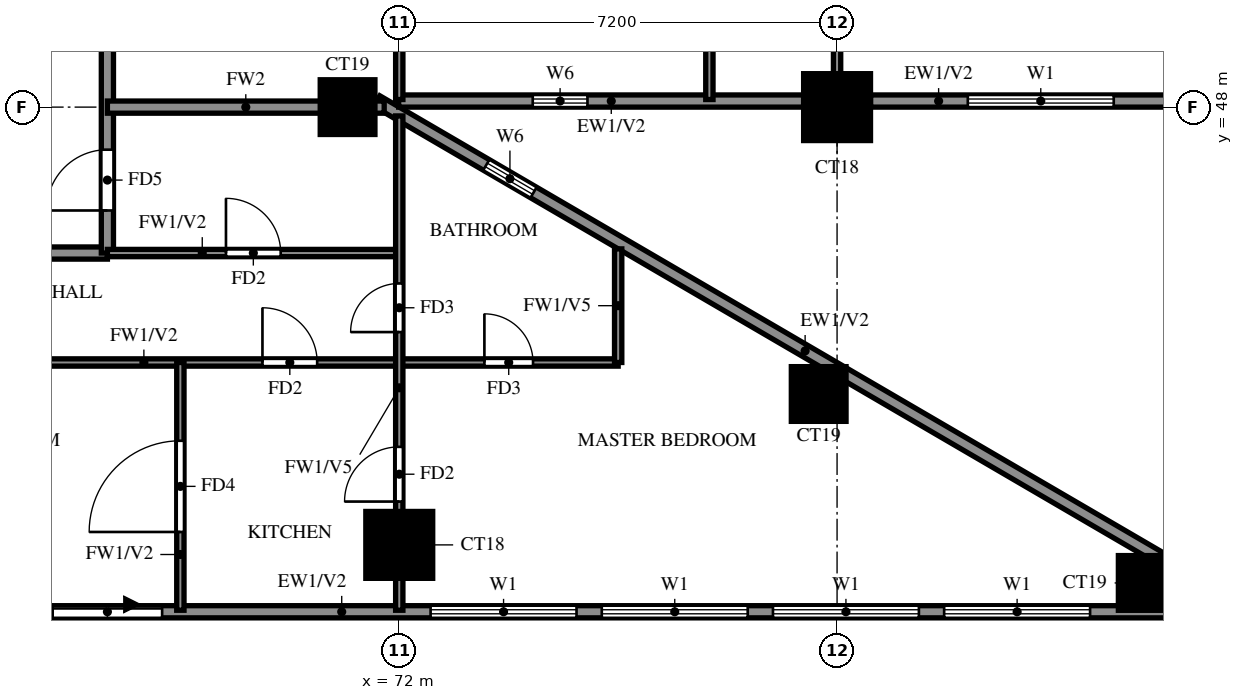
"""IFC4 building model, lengths in metres.
Left out: names, types, materials, properties, quantities, classifications, styles, units other than length and angle.
Written with IfcOpenShell. Run it as: python <this file> out.ifc"""

import sys

from ifc_helpers import new_model, si_unit, direction, frame, frame_2d, origin, origin_2d, place, context, subcontext, project, spatial, rectangle, extrude, source, transform, mapped, element, fill, save


model = new_model("IFC4")
c1 = context("Model", 3, precision=1e-05, world=origin(), true_north=direction((0.0, 1.0)))
c2 = subcontext(c1, "Body", "Model", "MODEL_VIEW")
j1 = project(units=[si_unit("LENGTHUNIT", "METRE"), si_unit("PLANEANGLEUNIT", "RADIAN")], contexts=[c1])
p1 = place(None, origin())
s1 = spatial("IfcSite", under=j1, at=p1, CompositionType="ELEMENT")
p2 = place(p1, origin())
s2 = spatial("IfcBuilding", under=s1, at=p2, CompositionType="ELEMENT")
p3 = place(p2, frame((0.0, 0.0, 116.5)))
s3 = spatial("IfcBuildingStorey", under=s2, at=p3, CompositionType="ELEMENT", Elevation=116.5)
m1 = source(origin(), c2, "Body", "SweptSolid", [
    extrude(rectangle(XDim=0.9, YDim=0.9, at=origin_2d()), origin(), (0.0, 0.0, 1.0), 3.2),
])
p4 = place(p3, frame((84.276, 40.174, 0.0), z_axis=(0.0, 0.0, 1.0), x_axis=(1.0, 0.0, 0.0)))
e1 = element("IfcColumn", 1, at=p4, inside=s3, PredefinedType="COLUMN", context=c2, shape_type="MappedRepresentation", body=[
    mapped(m1, transform((0.0, 0.0, 0.0))),
])
m2 = source(origin(), c2, "Body", "SweptSolid", [
    extrude(rectangle(XDim=1.1, YDim=1.1, at=origin_2d()), origin(), (0.0, 0.0, 1.0), 3.2),
])
p5 = place(p3, frame((72.0, 40.8, 0.0), z_axis=(0.0, 0.0, 1.0), x_axis=(1.0, 0.0, 0.0)))
e2 = element("IfcColumn", 2, at=p5, inside=s3, PredefinedType="COLUMN", context=c2, shape_type="MappedRepresentation", body=[
    mapped(m2, transform((0.0, 0.0, 0.0))),
])
for number, where, z_axis, x_axis in (
    (3, (78.898, 43.282, 0.0), (0.0, 0.0, 1.0), (1.0, 0.0, 0.0)),
    (4, (71.15, 48.0, 0.0), (0.0, 0.0, 1.0), (1.0, 0.0, 0.0)),
):
    element("IfcColumn", number, at=place(p3, frame(where, z_axis=z_axis, x_axis=x_axis)), inside=s3, PredefinedType="COLUMN", context=c2, shape_type="MappedRepresentation", body=[
        mapped(m1, transform((0.0, 0.0, 0.0))),
    ])
p6 = place(p3, frame((79.2, 48.0, 0.0), z_axis=(0.0, 0.0, 1.0), x_axis=(1.0, 0.0, 0.0)))
e5 = element("IfcColumn", 5, at=p6, inside=s3, PredefinedType="COLUMN", context=c2, shape_type="MappedRepresentation", body=[
    mapped(m2, transform((0.0, 0.0, 0.0))),
])
p7 = place(p3, frame((85.719, 39.881, 0.0), z_axis=(0.0, 0.0, 1.0), x_axis=(-0.86377618652, 0.503875678716, 0.0)))
e6 = element("IfcWall", 6, at=p7, inside=s3, PredefinedType="SOLIDWALL", context=c2, shape_type="SweptSolid", body=[
    extrude(rectangle(XDim=16.311, YDim=0.2, at=frame_2d((8.156, 0.0))), origin(), (0.0, 0.0, 1.0), 3.2),
])
p8 = place(p7, frame((13.326, 0.0, 1.5)))
e7 = element("IfcOpeningElement", 7, at=p8, cuts=e6, PredefinedType="OPENING", context=c2, shape_type="SweptSolid", body=[
    extrude(rectangle(XDim=0.9, YDim=0.9, at=frame_2d((0.45, 0.45))), frame((0.0, 0.11, 0.0), z_axis=(0.0, -1.0, 0.0), x_axis=(1.0, 0.0, 0.0)), (0.0, 0.0, 1.0), 0.22),
])
p9 = place(p3, frame((71.99, 48.1, 0.0), z_axis=(0.0, 0.0, 1.0), x_axis=(1.0, 0.0, 0.0)))
e8 = element("IfcWall", 8, at=p9, inside=s3, PredefinedType="SOLIDWALL", context=c2, shape_type="SweptSolid", body=[
    extrude(rectangle(XDim=6.66, YDim=0.2, at=frame_2d((3.33, 0.0))), origin(), (0.0, 0.0, 1.0), 3.2),
])
p10 = place(p9, frame((2.205, 0.0, 1.5)))
e9 = element("IfcOpeningElement", 9, at=p10, cuts=e8, PredefinedType="OPENING", context=c2, shape_type="SweptSolid", body=[
    extrude(rectangle(XDim=0.9, YDim=0.9, at=frame_2d((0.45, 0.45))), frame((0.0, 0.11, 0.0), z_axis=(0.0, -1.0, 0.0), x_axis=(1.0, 0.0, 0.0)), (0.0, 0.0, 1.0), 0.22),
])
p11 = place(p3, frame((79.75, 48.1, 0.0), z_axis=(0.0, 0.0, 1.0), x_axis=(1.0, 0.0, 0.0)))
e10 = element("IfcWall", 10, at=p11, inside=s3, PredefinedType="SOLIDWALL", context=c2, shape_type="SweptSolid", body=[
    extrude(rectangle(XDim=5.6, YDim=0.2, at=frame_2d((2.8, 0.0))), origin(), (0.0, 0.0, 1.0), 3.2),
])
p12 = place(p11, frame((1.6, 0.0, 0.6)))
e11 = element("IfcOpeningElement", 11, at=p12, cuts=e10, PredefinedType="OPENING", context=c2, shape_type="SweptSolid", body=[
    extrude(rectangle(XDim=2.4, YDim=2.4, at=frame_2d((1.2, 1.2))), frame((0.0, 0.11, 0.0), z_axis=(0.0, -1.0, 0.0), x_axis=(1.0, 0.0, 0.0)), (0.0, 0.0, 1.0), 0.22),
])
p13 = place(p3, frame((58.8, 39.7, 0.0), z_axis=(0.0, 0.0, 1.0), x_axis=(1.0, 0.0, 0.0)))
e12 = element("IfcWall", 12, at=p13, inside=s3, PredefinedType="SOLIDWALL", context=c2, shape_type="SweptSolid", body=[
    extrude(rectangle(XDim=27.23, YDim=0.2, at=frame_2d((13.615, 0.0))), origin(), (0.0, 0.0, 1.0), 3.2),
])
p14 = place(p13, frame((7.5, 0.0, 0.0)))
e13 = element("IfcOpeningElement", 13, at=p14, cuts=e12, PredefinedType="OPENING", context=c2, shape_type="SweptSolid", body=[
    extrude(rectangle(XDim=1.8, YDim=2.4, at=frame_2d((0.9, 1.2))), frame((0.0, 0.11, 0.0), z_axis=(0.0, -1.0, 0.0), x_axis=(1.0, 0.0, 0.0)), (0.0, 0.0, 1.0), 0.22),
])
p15 = place(p13, frame((2.4, 0.0, 0.6)))
e14 = element("IfcOpeningElement", 14, at=p15, cuts=e12, PredefinedType="OPENING", context=c2, shape_type="SweptSolid", body=[
    extrude(rectangle(XDim=2.4, YDim=2.4, at=frame_2d((1.2, 1.2))), frame((0.0, 0.11, 0.0), z_axis=(0.0, -1.0, 0.0), x_axis=(1.0, 0.0, 0.0)), (0.0, 0.0, 1.0), 0.22),
])
p16 = place(p13, frame((13.715, 0.0, 0.6)))
e15 = element("IfcOpeningElement", 15, at=p16, cuts=e12, PredefinedType="OPENING", context=c2, shape_type="SweptSolid", body=[
    extrude(rectangle(XDim=2.4, YDim=2.4, at=frame_2d((1.2, 1.2))), frame((0.0, 0.11, 0.0), z_axis=(0.0, -1.0, 0.0), x_axis=(1.0, 0.0, 0.0)), (0.0, 0.0, 1.0), 0.22),
])
p17 = place(p13, frame((16.531, 0.0, 0.6)))
e16 = element("IfcOpeningElement", 16, at=p17, cuts=e12, PredefinedType="OPENING", context=c2, shape_type="SweptSolid", body=[
    extrude(rectangle(XDim=2.4, YDim=2.4, at=frame_2d((1.2, 1.2))), frame((0.0, 0.11, 0.0), z_axis=(0.0, -1.0, 0.0), x_axis=(1.0, 0.0, 0.0)), (0.0, 0.0, 1.0), 0.22),
])
p18 = place(p13, frame((19.346, 0.0, 0.6)))
e17 = element("IfcOpeningElement", 17, at=p18, cuts=e12, PredefinedType="OPENING", context=c2, shape_type="SweptSolid", body=[
    extrude(rectangle(XDim=2.4, YDim=2.4, at=frame_2d((1.2, 1.2))), frame((0.0, 0.11, 0.0), z_axis=(0.0, -1.0, 0.0), x_axis=(1.0, 0.0, 0.0)), (0.0, 0.0, 1.0), 0.22),
])
p19 = place(p13, frame((22.161, 0.0, 0.6)))
e18 = element("IfcOpeningElement", 18, at=p19, cuts=e12, PredefinedType="OPENING", context=c2, shape_type="SweptSolid", body=[
    extrude(rectangle(XDim=2.4, YDim=2.4, at=frame_2d((1.2, 1.2))), frame((0.0, 0.11, 0.0), z_axis=(0.0, -1.0, 0.0), x_axis=(1.0, 0.0, 0.0)), (0.0, 0.0, 1.0), 0.22),
])
p20 = place(p13, frame((26.003, 0.0, 0.6)))
e19 = element("IfcOpeningElement", 19, at=p20, cuts=e12, PredefinedType="OPENING", context=c2, shape_type="SweptSolid", body=[
    extrude(rectangle(XDim=0.9, YDim=2.4, at=frame_2d((0.45, 1.2))), frame((0.0, 0.11, 0.0), z_axis=(0.0, -1.0, 0.0), x_axis=(1.0, 0.0, 0.0)), (0.0, 0.0, 1.0), 0.22),
])
p21 = place(p3, frame((60.0, 45.6, 0.0), z_axis=(0.0, 0.0, 1.0), x_axis=(1.0, 0.0, 0.0)))
e20 = element("IfcWall", 20, at=p21, inside=s3, PredefinedType="SOLIDWALL", context=c2, shape_type="SweptSolid", body=[
    extrude(rectangle(XDim=7.2, YDim=0.2, at=frame_2d((3.6, 0.0))), origin(), (0.0, 0.0, 1.0), 3.2),
])
p22 = place(p3, frame((67.2, 45.6, 0.0), z_axis=(0.0, 0.0, 1.0), x_axis=(0.0, 1.0, 0.0)))
e21 = element("IfcWall", 21, at=p22, inside=s3, PredefinedType="SOLIDWALL", context=c2, shape_type="SweptSolid", body=[
    extrude(rectangle(XDim=8.4, YDim=0.2, at=frame_2d((4.2, 0.0))), origin(), (0.0, 0.0, 1.0), 3.2),
])
p23 = place(p22, frame((0.7, 0.0, 0.0)))
e22 = element("IfcOpeningElement", 22, at=p23, cuts=e21, PredefinedType="OPENING", context=c2, shape_type="SweptSolid", body=[
    extrude(rectangle(XDim=1.0, YDim=2.1, at=frame_2d((0.5, 1.05))), frame((0.0, 0.11, 0.0), z_axis=(0.0, -1.0, 0.0), x_axis=(1.0, 0.0, 0.0)), (0.0, 0.0, 1.0), 0.22),
])
p24 = place(p3, frame((67.2, 48.0, 0.0), z_axis=(0.0, 0.0, 1.0), x_axis=(1.0, 0.0, 0.0)))
e23 = element("IfcWall", 23, at=p24, inside=s3, PredefinedType="SOLIDWALL", context=c2, shape_type="SweptSolid", body=[
    extrude(rectangle(XDim=4.552, YDim=0.2, at=frame_2d((2.276, 0.0))), origin(), (0.0, 0.0, 1.0), 3.2),
])
p25 = place(p3, frame((60.0, 43.8, 0.0), z_axis=(0.0, 0.0, 1.0), x_axis=(1.0, 0.0, 0.0)))
e24 = element("IfcWall", 24, at=p25, inside=s3, PredefinedType="PARTITIONING", context=c2, shape_type="SweptSolid", body=[
    extrude(rectangle(XDim=15.6, YDim=0.12, at=frame_2d((7.8, 0.0))), origin(), (0.0, 0.0, 1.0), 3.2),
])
p26 = place(p25, frame((9.75, 0.0, 0.0)))
e25 = element("IfcOpeningElement", 25, at=p26, cuts=e24, PredefinedType="OPENING", context=c2, shape_type="SweptSolid", body=[
    extrude(rectangle(XDim=0.9, YDim=2.1, at=frame_2d((0.45, 1.05))), frame((0.0, 0.07, 0.0), z_axis=(0.0, -1.0, 0.0), x_axis=(1.0, 0.0, 0.0)), (0.0, 0.0, 1.0), 0.14),
])
p27 = place(p25, frame((3.45, 0.0, 0.0)))
e26 = element("IfcOpeningElement", 26, at=p27, cuts=e24, PredefinedType="OPENING", context=c2, shape_type="SweptSolid", body=[
    extrude(rectangle(XDim=1.5, YDim=2.1, at=frame_2d((0.75, 1.05))), frame((0.0, 0.07, 0.0), z_axis=(0.0, -1.0, 0.0), x_axis=(1.0, 0.0, 0.0)), (0.0, 0.0, 1.0), 0.14),
])
p28 = place(p25, frame((13.4, 0.0, 0.0)))
e27 = element("IfcOpeningElement", 27, at=p28, cuts=e24, PredefinedType="OPENING", context=c2, shape_type="SweptSolid", body=[
    extrude(rectangle(XDim=0.8, YDim=2.1, at=frame_2d((0.4, 1.05))), frame((0.0, 0.07, 0.0), z_axis=(0.0, -1.0, 0.0), x_axis=(1.0, 0.0, 0.0)), (0.0, 0.0, 1.0), 0.14),
])
p29 = place(p3, frame((67.2, 45.6, 0.0), z_axis=(0.0, 0.0, 1.0), x_axis=(1.0, 0.0, 0.0)))
e28 = element("IfcWall", 28, at=p29, inside=s3, PredefinedType="PARTITIONING", context=c2, shape_type="SweptSolid", body=[
    extrude(rectangle(XDim=4.8, YDim=0.12, at=frame_2d((2.4, 0.0))), origin(), (0.0, 0.0, 1.0), 3.2),
])
p30 = place(p29, frame((1.95, 0.0, 0.0)))
e29 = element("IfcOpeningElement", 29, at=p30, cuts=e28, PredefinedType="OPENING", context=c2, shape_type="SweptSolid", body=[
    extrude(rectangle(XDim=0.9, YDim=2.1, at=frame_2d((0.45, 1.05))), frame((0.0, 0.07, 0.0), z_axis=(0.0, -1.0, 0.0), x_axis=(1.0, 0.0, 0.0)), (0.0, 0.0, 1.0), 0.14),
])
p31 = place(p3, frame((68.4, 39.725, 0.0), z_axis=(0.0, 0.0, 1.0), x_axis=(0.0, 1.0, 0.0)))
e30 = element("IfcWall", 30, at=p31, inside=s3, PredefinedType="PARTITIONING", context=c2, shape_type="SweptSolid", body=[
    extrude(rectangle(XDim=4.075, YDim=0.12, at=frame_2d((2.038, 0.0))), origin(), (0.0, 0.0, 1.0), 3.2),
])
p32 = place(p31, frame((1.288, 0.0, 0.0)))
e31 = element("IfcOpeningElement", 31, at=p32, cuts=e30, PredefinedType="OPENING", context=c2, shape_type="SweptSolid", body=[
    extrude(rectangle(XDim=1.5, YDim=2.1, at=frame_2d((0.75, 1.05))), frame((0.0, 0.07, 0.0), z_axis=(0.0, -1.0, 0.0), x_axis=(1.0, 0.0, 0.0)), (0.0, 0.0, 1.0), 0.14),
])
p33 = place(p3, frame((72.0, 39.725, 0.0), z_axis=(0.0, 0.0, 1.0), x_axis=(0.0, 1.0, 0.0)))
e32 = element("IfcWall", 32, at=p33, inside=s3, PredefinedType="PARTITIONING", context=c2, shape_type="SweptSolid", body=[
    extrude(rectangle(XDim=8.13, YDim=0.12, at=frame_2d((4.065, 0.0))), origin(), (0.0, 0.0, 1.0), 2.3),
])
p34 = place(p33, frame((1.788, 0.0, 0.0)))
e33 = element("IfcOpeningElement", 33, at=p34, cuts=e32, PredefinedType="OPENING", context=c2, shape_type="SweptSolid", body=[
    extrude(rectangle(XDim=0.9, YDim=2.1, at=frame_2d((0.45, 1.05))), frame((0.0, 0.07, 0.0), z_axis=(0.0, -1.0, 0.0), x_axis=(1.0, 0.0, 0.0)), (0.0, 0.0, 1.0), 0.14),
])
p35 = place(p33, frame((4.575, 0.0, 0.0)))
e34 = element("IfcOpeningElement", 34, at=p35, cuts=e32, PredefinedType="OPENING", context=c2, shape_type="SweptSolid", body=[
    extrude(rectangle(XDim=0.8, YDim=2.1, at=frame_2d((0.4, 1.05))), frame((0.0, 0.07, 0.0), z_axis=(0.0, -1.0, 0.0), x_axis=(1.0, 0.0, 0.0)), (0.0, 0.0, 1.0), 0.14),
])
p36 = place(p3, frame((72.0, 48.125, 0.0), z_axis=(0.0, 0.0, 1.0), x_axis=(0.0, 1.0, 0.0)))
e35 = element("IfcWall", 35, at=p36, inside=s3, PredefinedType="PARTITIONING", context=c2, shape_type="SweptSolid", body=[
    extrude(rectangle(XDim=3.475, YDim=0.12, at=frame_2d((1.738, 0.0))), origin(), (0.0, 0.0, 1.0), 3.2),
])
p37 = place(p3, frame((75.6, 43.8, 0.0), z_axis=(0.0, 0.0, 1.0), x_axis=(0.0, 1.0, 0.0)))
e36 = element("IfcWall", 36, at=p37, inside=s3, PredefinedType="PARTITIONING", context=c2, shape_type="SweptSolid", body=[
    extrude(rectangle(XDim=1.868, YDim=0.12, at=frame_2d((0.934, 0.0))), origin(), (0.0, 0.0, 1.0), 2.3),
])
p38 = place(p3, frame((77.1, 48.125, 0.0), z_axis=(0.0, 0.0, 1.0), x_axis=(0.0, 1.0, 0.0)))
e37 = element("IfcWall", 37, at=p38, inside=s3, PredefinedType="PARTITIONING", context=c2, shape_type="SweptSolid", body=[
    extrude(rectangle(XDim=3.475, YDim=0.12, at=frame_2d((1.738, 0.0))), origin(), (0.0, 0.0, 1.0), 3.2),
])
p39 = place(p3, frame((79.2, 48.125, 0.0), z_axis=(0.0, 0.0, 1.0), x_axis=(0.0, 1.0, 0.0)))
e38 = element("IfcWall", 38, at=p39, inside=s3, PredefinedType="PARTITIONING", context=c2, shape_type="SweptSolid", body=[
    extrude(rectangle(XDim=21.475, YDim=0.12, at=frame_2d((10.738, 0.0))), origin(), (0.0, 0.0, 1.0), 3.2),
])
p40 = place(p39, frame((1.288, 0.0, 0.0)))
e39 = element("IfcOpeningElement", 39, at=p40, cuts=e38, PredefinedType="OPENING", context=c2, shape_type="SweptSolid", body=[
    extrude(rectangle(XDim=0.9, YDim=2.1, at=frame_2d((0.45, 1.05))), frame((0.0, 0.07, 0.0), z_axis=(0.0, -1.0, 0.0), x_axis=(1.0, 0.0, 0.0)), (0.0, 0.0, 1.0), 0.14),
])
p41 = place(p39, frame((7.825, 0.0, 0.0)))
e40 = element("IfcOpeningElement", 40, at=p41, cuts=e38, PredefinedType="OPENING", context=c2, shape_type="SweptSolid", body=[
    extrude(rectangle(XDim=1.5, YDim=2.1, at=frame_2d((0.75, 1.05))), frame((0.0, 0.07, 0.0), z_axis=(0.0, -1.0, 0.0), x_axis=(1.0, 0.0, 0.0)), (0.0, 0.0, 1.0), 0.14),
])
p42 = place(p39, frame((12.025, 0.0, 0.0)))
e41 = element("IfcOpeningElement", 41, at=p42, cuts=e38, PredefinedType="OPENING", context=c2, shape_type="SweptSolid", body=[
    extrude(rectangle(XDim=0.9, YDim=2.1, at=frame_2d((0.45, 1.05))), frame((0.0, 0.07, 0.0), z_axis=(0.0, -1.0, 0.0), x_axis=(1.0, 0.0, 0.0)), (0.0, 0.0, 1.0), 0.14),
])
p43 = place(p39, frame((17.425, 0.0, 0.0)))
e42 = element("IfcOpeningElement", 42, at=p43, cuts=e38, PredefinedType="OPENING", context=c2, shape_type="SweptSolid", body=[
    extrude(rectangle(XDim=0.9, YDim=2.1, at=frame_2d((0.45, 1.05))), frame((0.0, 0.07, 0.0), z_axis=(0.0, -1.0, 0.0), x_axis=(1.0, 0.0, 0.0)), (0.0, 0.0, 1.0), 0.14),
])
p44 = place(p8, origin())
e43 = element("IfcWindow", 43, at=p44, inside=s3, PartitioningType="SINGLE_PANEL", PredefinedType="WINDOW", context=c2, shape_type="SweptSolid", body=[
    extrude(rectangle(XDim=0.9, YDim=0.9, at=frame_2d((0.45, 0.45))), frame((0.0, 0.03, 0.0), z_axis=(0.0, -1.0, 0.0), x_axis=(1.0, 0.0, 0.0)), (0.0, 0.0, 1.0), 0.06),
])
fill(e7, e43)
p45 = place(p10, origin())
e44 = element("IfcWindow", 44, at=p45, inside=s3, PartitioningType="SINGLE_PANEL", PredefinedType="WINDOW", context=c2, shape_type="SweptSolid", body=[
    extrude(rectangle(XDim=0.9, YDim=0.9, at=frame_2d((0.45, 0.45))), frame((0.0, 0.03, 0.0), z_axis=(0.0, -1.0, 0.0), x_axis=(1.0, 0.0, 0.0)), (0.0, 0.0, 1.0), 0.06),
])
fill(e9, e44)
p46 = place(p12, origin())
e45 = element("IfcWindow", 45, at=p46, inside=s3, PartitioningType="DOUBLE_PANEL_VERTICAL", PredefinedType="WINDOW", context=c2, shape_type="SweptSolid", body=[
    extrude(rectangle(XDim=2.4, YDim=2.4, at=frame_2d((1.2, 1.2))), frame((0.0, 0.03, 0.0), z_axis=(0.0, -1.0, 0.0), x_axis=(1.0, 0.0, 0.0)), (0.0, 0.0, 1.0), 0.06),
])
fill(e11, e45)
p47 = place(p14, origin())
e46 = element("IfcDoor", 46, at=p47, inside=s3, OperationType="DOUBLE_DOOR_SLIDING", PredefinedType="DOOR", context=c2, shape_type="SweptSolid", body=[
    extrude(rectangle(XDim=1.8, YDim=2.4, at=frame_2d((0.9, 1.2))), frame((0.0, 0.025, 0.0), z_axis=(0.0, -1.0, 0.0), x_axis=(1.0, 0.0, 0.0)), (0.0, 0.0, 1.0), 0.05),
])
fill(e13, e46)
p48 = place(p16, origin())
e47 = element("IfcWindow", 47, at=p48, inside=s3, PartitioningType="DOUBLE_PANEL_VERTICAL", PredefinedType="WINDOW", context=c2, shape_type="SweptSolid", body=[
    extrude(rectangle(XDim=2.4, YDim=2.4, at=frame_2d((1.2, 1.2))), frame((0.0, 0.03, 0.0), z_axis=(0.0, -1.0, 0.0), x_axis=(1.0, 0.0, 0.0)), (0.0, 0.0, 1.0), 0.06),
])
fill(e15, e47)
p49 = place(p17, origin())
e48 = element("IfcWindow", 48, at=p49, inside=s3, PartitioningType="DOUBLE_PANEL_VERTICAL", PredefinedType="WINDOW", context=c2, shape_type="SweptSolid", body=[
    extrude(rectangle(XDim=2.4, YDim=2.4, at=frame_2d((1.2, 1.2))), frame((0.0, 0.03, 0.0), z_axis=(0.0, -1.0, 0.0), x_axis=(1.0, 0.0, 0.0)), (0.0, 0.0, 1.0), 0.06),
])
fill(e16, e48)
p50 = place(p18, origin())
e49 = element("IfcWindow", 49, at=p50, inside=s3, PartitioningType="DOUBLE_PANEL_VERTICAL", PredefinedType="WINDOW", context=c2, shape_type="SweptSolid", body=[
    extrude(rectangle(XDim=2.4, YDim=2.4, at=frame_2d((1.2, 1.2))), frame((0.0, 0.03, 0.0), z_axis=(0.0, -1.0, 0.0), x_axis=(1.0, 0.0, 0.0)), (0.0, 0.0, 1.0), 0.06),
])
fill(e17, e49)
p51 = place(p19, origin())
e50 = element("IfcWindow", 50, at=p51, inside=s3, PartitioningType="DOUBLE_PANEL_VERTICAL", PredefinedType="WINDOW", context=c2, shape_type="SweptSolid", body=[
    extrude(rectangle(XDim=2.4, YDim=2.4, at=frame_2d((1.2, 1.2))), frame((0.0, 0.03, 0.0), z_axis=(0.0, -1.0, 0.0), x_axis=(1.0, 0.0, 0.0)), (0.0, 0.0, 1.0), 0.06),
])
fill(e18, e50)
p52 = place(p32, origin())
e51 = element("IfcDoor", 51, at=p52, inside=s3, OperationType="SINGLE_SWING_LEFT", PredefinedType="DOOR", context=c2, shape_type="SweptSolid", body=[
    extrude(rectangle(XDim=1.5, YDim=2.1, at=frame_2d((0.75, 1.05))), frame((0.0, 0.025, 0.0), z_axis=(0.0, -1.0, 0.0), x_axis=(1.0, 0.0, 0.0)), (0.0, 0.0, 1.0), 0.05),
])
fill(e31, e51)
p53 = place(p30, origin())
e52 = element("IfcDoor", 52, at=p53, inside=s3, OperationType="SINGLE_SWING_LEFT", PredefinedType="DOOR", context=c2, shape_type="SweptSolid", body=[
    extrude(rectangle(XDim=0.9, YDim=2.1, at=frame_2d((0.45, 1.05))), frame((0.0, 0.025, 0.0), z_axis=(0.0, -1.0, 0.0), x_axis=(1.0, 0.0, 0.0)), (0.0, 0.0, 1.0), 0.05),
])
fill(e29, e52)
p54 = place(p23, origin())
e53 = element("IfcDoor", 53, at=p54, inside=s3, OperationType="SINGLE_SWING_RIGHT", PredefinedType="DOOR", context=c2, shape_type="SweptSolid", body=[
    extrude(rectangle(XDim=1.0, YDim=2.1, at=frame_2d((0.5, 1.05))), frame((0.0, 0.025, 0.0), z_axis=(0.0, -1.0, 0.0), x_axis=(1.0, 0.0, 0.0)), (0.0, 0.0, 1.0), 0.05),
])
fill(e22, e53)
p55 = place(p26, origin())
e54 = element("IfcDoor", 54, at=p55, inside=s3, OperationType="SINGLE_SWING_LEFT", PredefinedType="DOOR", context=c2, shape_type="SweptSolid", body=[
    extrude(rectangle(XDim=0.9, YDim=2.1, at=frame_2d((0.45, 1.05))), frame((0.0, 0.025, 0.0), z_axis=(0.0, -1.0, 0.0), x_axis=(1.0, 0.0, 0.0)), (0.0, 0.0, 1.0), 0.05),
])
fill(e25, e54)
p56 = place(p34, origin())
e55 = element("IfcDoor", 55, at=p56, inside=s3, OperationType="SINGLE_SWING_LEFT", PredefinedType="DOOR", context=c2, shape_type="SweptSolid", body=[
    extrude(rectangle(XDim=0.9, YDim=2.1, at=frame_2d((0.45, 1.05))), frame((0.0, 0.025, 0.0), z_axis=(0.0, -1.0, 0.0), x_axis=(1.0, 0.0, 0.0)), (0.0, 0.0, 1.0), 0.05),
])
fill(e33, e55)
p57 = place(p35, origin())
e56 = element("IfcDoor", 56, at=p57, inside=s3, OperationType="SINGLE_SWING_LEFT", PredefinedType="DOOR", context=c2, shape_type="SweptSolid", body=[
    extrude(rectangle(XDim=0.8, YDim=2.1, at=frame_2d((0.4, 1.05))), frame((0.0, 0.025, 0.0), z_axis=(0.0, -1.0, 0.0), x_axis=(1.0, 0.0, 0.0)), (0.0, 0.0, 1.0), 0.05),
])
fill(e34, e56)
p58 = place(p28, origin())
e57 = element("IfcDoor", 57, at=p58, inside=s3, OperationType="SINGLE_SWING_LEFT", PredefinedType="DOOR", context=c2, shape_type="SweptSolid", body=[
    extrude(rectangle(XDim=0.8, YDim=2.1, at=frame_2d((0.4, 1.05))), frame((0.0, 0.025, 0.0), z_axis=(0.0, -1.0, 0.0), x_axis=(1.0, 0.0, 0.0)), (0.0, 0.0, 1.0), 0.05),
])
fill(e27, e57)
save(model, sys.argv[1])
